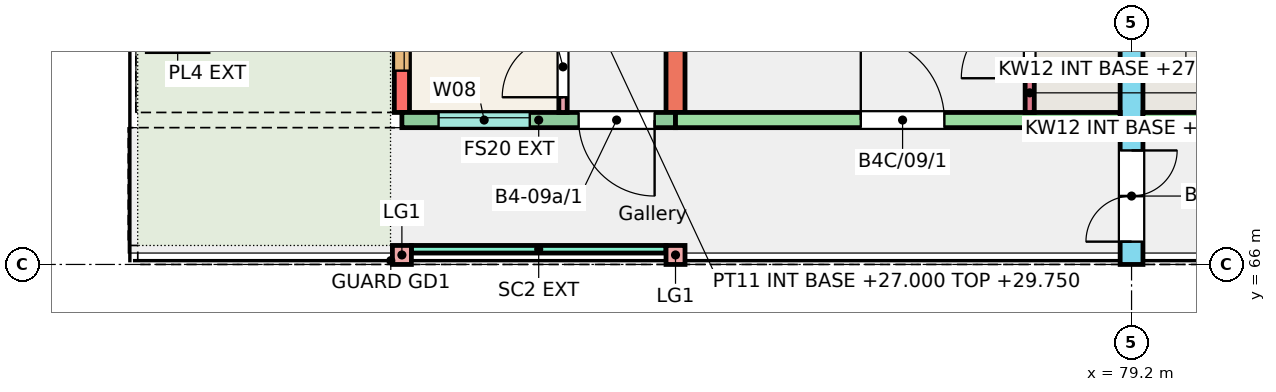
"""IFC4 building model, lengths in metres.
Left out: names, types, materials, properties, quantities, classifications, styles, units other than length and angle.
Written with IfcOpenShell. Run it as: python <this file> out.ifc"""

import sys

from ifc_helpers import new_model, si_unit, direction, frame, frame_2d, origin, origin_2d, place, context, subcontext, project, spatial, rectangle, extrude, element, fill, save


model = new_model("IFC4")
c1 = context("Model", 3, precision=1e-05, world=origin(), true_north=direction((0.0, 1.0)))
c2 = subcontext(c1, "Body", "Model", "MODEL_VIEW")
j1 = project(units=[si_unit("LENGTHUNIT", "METRE"), si_unit("PLANEANGLEUNIT", "RADIAN")], contexts=[c1])
p1 = place(None, origin())
s1 = spatial("IfcSite", under=j1, at=p1, CompositionType="ELEMENT")
p2 = place(p1, origin())
s2 = spatial("IfcBuilding", under=s1, at=p2, CompositionType="ELEMENT")
p3 = place(p2, frame((0.0, 0.0, 27.0)))
s3 = spatial("IfcBuildingStorey", under=s2, at=p3, CompositionType="ELEMENT", Elevation=27.0)
p4 = place(p3, frame((69.6, 68.0, 0.0), z_axis=(0.0, 0.0, 1.0), x_axis=(0.0, 1.0, 0.0)))
e1 = element("IfcWall", 1, at=p4, inside=s3, PredefinedType="SHEAR", context=c2, shape_type="SweptSolid", body=[
    extrude(rectangle(XDim=9.0, YDim=0.2, at=frame_2d((4.5, 0.0))), origin(), (0.0, 0.0, 1.0), 3.0),
])
p5 = place(p4, frame((0.55, 0.0, 0.9)))
e2 = element("IfcOpeningElement", 2, at=p5, cuts=e1, PredefinedType="OPENING", context=c2, shape_type="SweptSolid", body=[
    extrude(rectangle(XDim=1.2, YDim=1.5, at=frame_2d((0.6, 0.75))), frame((0.0, 0.11, 0.0), z_axis=(0.0, -1.0, 0.0), x_axis=(1.0, 0.0, 0.0)), (0.0, 0.0, 1.0), 0.22),
])
p6 = place(p4, frame((7.552, 0.0, 0.9)))
e3 = element("IfcOpeningElement", 3, at=p6, cuts=e1, PredefinedType="OPENING", context=c2, shape_type="SweptSolid", body=[
    extrude(rectangle(XDim=1.2, YDim=1.5, at=frame_2d((0.6, 0.75))), frame((0.0, 0.11, 0.0), z_axis=(0.0, -1.0, 0.0), x_axis=(1.0, 0.0, 0.0)), (0.0, 0.0, 1.0), 0.22),
])
p7 = place(p4, frame((6.205, 0.0, 0.0)))
e4 = element("IfcOpeningElement", 4, at=p7, cuts=e1, PredefinedType="OPENING", context=c2, shape_type="SweptSolid", body=[
    extrude(rectangle(XDim=1.0, YDim=2.1, at=frame_2d((0.5, 1.05))), frame((0.0, 0.11, 0.0), z_axis=(0.0, -1.0, 0.0), x_axis=(1.0, 0.0, 0.0)), (0.0, 0.0, 1.0), 0.22),
])
p8 = place(p3, frame((73.2, 68.0, 0.0), z_axis=(0.0, 0.0, 1.0), x_axis=(0.0, 1.0, 0.0)))
e5 = element("IfcWall", 5, at=p8, inside=s3, PredefinedType="SHEAR", context=c2, shape_type="SweptSolid", body=[
    extrude(rectangle(XDim=9.0, YDim=0.25, at=frame_2d((4.5, 0.0))), origin(), (0.0, 0.0, 1.0), 3.0),
])
p9 = place(p3, frame((79.2, 66.0, 0.0), z_axis=(0.0, 0.0, 1.0), x_axis=(0.0, 1.0, 0.0)))
e6 = element("IfcWall", 6, at=p9, inside=s3, PredefinedType="SHEAR", context=c2, shape_type="SweptSolid", body=[
    extrude(rectangle(XDim=11.0, YDim=0.3, at=frame_2d((5.5, 0.0))), origin(), (0.0, 0.0, 1.0), 3.0),
])
p10 = place(p9, frame((0.3, 0.0, 0.0)))
e7 = element("IfcOpeningElement", 7, at=p10, cuts=e6, PredefinedType="OPENING", context=c2, shape_type="SweptSolid", body=[
    extrude(rectangle(XDim=1.2, YDim=2.1, at=frame_2d((0.6, 1.05))), frame((0.0, 0.16, 0.0), z_axis=(0.0, -1.0, 0.0), x_axis=(1.0, 0.0, 0.0)), (0.0, 0.0, 1.0), 0.32),
])
p11 = place(p3, frame((69.6, 67.9, 0.0), z_axis=(0.0, 0.0, 1.0), x_axis=(1.0, 0.0, 0.0)))
e8 = element("IfcWall", 8, at=p11, inside=s3, PredefinedType="SOLIDWALL", context=c2, shape_type="SweptSolid", body=[
    extrude(rectangle(XDim=3.6, YDim=0.2, at=frame_2d((1.8, 0.0))), origin(), (0.0, 0.0, 1.0), 3.0),
])
p12 = place(p11, frame((0.482, 0.0, 1.1)))
e9 = element("IfcOpeningElement", 9, at=p12, cuts=e8, PredefinedType="OPENING", context=c2, shape_type="SweptSolid", body=[
    extrude(rectangle(XDim=1.2, YDim=1.3, at=frame_2d((0.6, 0.65))), frame((0.0, 0.11, 0.0), z_axis=(0.0, -1.0, 0.0), x_axis=(1.0, 0.0, 0.0)), (0.0, 0.0, 1.0), 0.22),
])
p13 = place(p11, frame((2.325, 0.0, 0.0)))
e10 = element("IfcOpeningElement", 10, at=p13, cuts=e8, PredefinedType="OPENING", context=c2, shape_type="SweptSolid", body=[
    extrude(rectangle(XDim=1.0, YDim=2.1, at=frame_2d((0.5, 1.05))), frame((0.0, 0.11, 0.0), z_axis=(0.0, -1.0, 0.0), x_axis=(1.0, 0.0, 0.0)), (0.0, 0.0, 1.0), 0.22),
])
p14 = place(p3, frame((73.2, 67.9, 0.0), z_axis=(0.0, 0.0, 1.0), x_axis=(1.0, 0.0, 0.0)))
e11 = element("IfcWall", 11, at=p14, inside=s3, PredefinedType="SHEAR", context=c2, shape_type="SweptSolid", body=[
    extrude(rectangle(XDim=5.85, YDim=0.2, at=frame_2d((2.925, 0.0))), origin(), (0.0, 0.0, 1.0), 3.0),
])
p15 = place(p14, frame((2.438, 0.0, 0.0)))
e12 = element("IfcOpeningElement", 12, at=p15, cuts=e11, PredefinedType="OPENING", context=c2, shape_type="SweptSolid", body=[
    extrude(rectangle(XDim=1.1, YDim=2.1, at=frame_2d((0.55, 1.05))), frame((0.0, 0.11, 0.0), z_axis=(0.0, -1.0, 0.0), x_axis=(1.0, 0.0, 0.0)), (0.0, 0.0, 1.0), 0.22),
])
p16 = place(p3, frame((77.86, 68.0, 0.0), z_axis=(0.0, 0.0, 1.0), x_axis=(0.0, 1.0, 0.0)))
e13 = element("IfcWall", 13, at=p16, inside=s3, PredefinedType="SHEAR", context=c2, shape_type="SweptSolid", body=[
    extrude(rectangle(XDim=1.72, YDim=0.12, at=frame_2d((0.86, 0.0))), origin(), (0.0, 0.0, 1.0), 3.0),
])
p17 = place(p16, frame((0.45, 0.0, 0.0)))
e14 = element("IfcOpeningElement", 14, at=p17, cuts=e13, PredefinedType="OPENING", context=c2, shape_type="SweptSolid", body=[
    extrude(rectangle(XDim=0.9, YDim=2.1, at=frame_2d((0.45, 1.05))), frame((0.0, 0.07, 0.0), z_axis=(0.0, -1.0, 0.0), x_axis=(1.0, 0.0, 0.0)), (0.0, 0.0, 1.0), 0.14),
])
p18 = place(p3, frame((79.35, 67.9, 0.0), z_axis=(0.0, 0.0, 1.0), x_axis=(1.0, 0.0, 0.0)))
e15 = element("IfcWall", 15, at=p18, inside=s3, PredefinedType="SHEAR", context=c2, shape_type="SweptSolid", body=[
    extrude(rectangle(XDim=5.85, YDim=0.2, at=frame_2d((2.925, 0.0))), origin(), (0.0, 0.0, 1.0), 2.75),
])
p19 = place(p18, frame((2.312, 0.0, 0.0)))
e16 = element("IfcOpeningElement", 16, at=p19, cuts=e15, PredefinedType="OPENING", context=c2, shape_type="SweptSolid", body=[
    extrude(rectangle(XDim=1.1, YDim=2.1, at=frame_2d((0.55, 1.05))), frame((0.0, 0.11, 0.0), z_axis=(0.0, -1.0, 0.0), x_axis=(1.0, 0.0, 0.0)), (0.0, 0.0, 1.0), 0.22),
])
for number, where, z_axis, x_axis in (
    (17, (69.6, 66.125, 0.0), (0.0, 0.0, 1.0), (1.0, 0.0, 0.0)),
    (18, (73.2, 66.125, 0.0), (0.0, 0.0, 1.0), (1.0, 0.0, 0.0)),
):
    element("IfcColumn", number, at=place(p3, frame(where, z_axis=z_axis, x_axis=x_axis)), inside=s3, PredefinedType="COLUMN", context=c2, shape_type="SweptSolid", body=[
        extrude(rectangle(XDim=0.25, YDim=0.25, at=origin_2d()), origin(), (0.0, 0.0, 1.0), 3.0),
    ])
p20 = place(p3, frame((66.25, 68.9, 0.01), z_axis=(0.0, 0.0, 1.0), x_axis=(1.0, 0.0, 0.0)))
e19 = element("IfcWall", 19, at=p20, inside=s3, PredefinedType="SOLIDWALL", context=c2, shape_type="SweptSolid", body=[
    extrude(rectangle(XDim=0.8, YDim=0.2, at=frame_2d((0.4, 0.0))), origin(), (0.0, 0.0, 1.0), 0.45),
])
p21 = place(p3, frame((69.725, 66.2, 0.0), z_axis=(0.0, 0.0, 1.0), x_axis=(1.0, 0.0, 0.0)))
e20 = element("IfcWall", 20, at=p21, inside=s3, PredefinedType="SOLIDWALL", context=c2, shape_type="SweptSolid", body=[
    extrude(rectangle(XDim=3.35, YDim=0.1, at=frame_2d((1.675, 0.0))), origin(), (0.0, 0.0, 1.0), 2.45),
])
p22 = place(p3, frame((71.72, 68.0, 0.0), z_axis=(0.0, 0.0, 1.0), x_axis=(0.0, 1.0, 0.0)))
e21 = element("IfcWall", 21, at=p22, inside=s3, PredefinedType="PARTITIONING", context=c2, shape_type="SweptSolid", body=[
    extrude(rectangle(XDim=4.3, YDim=0.11, at=frame_2d((2.15, 0.0))), origin(), (0.0, 0.0, 1.0), 2.75),
])
p23 = place(p22, frame((0.2, 0.0, 0.0)))
e22 = element("IfcOpeningElement", 22, at=p23, cuts=e21, PredefinedType="OPENING", context=c2, shape_type="SweptSolid", body=[
    extrude(rectangle(XDim=0.8, YDim=2.1, at=frame_2d((0.4, 1.05))), frame((0.0, 0.065, 0.0), z_axis=(0.0, -1.0, 0.0), x_axis=(1.0, 0.0, 0.0)), (0.0, 0.0, 1.0), 0.13),
])
p24 = place(p22, frame((3.35, 0.0, 0.0)))
e23 = element("IfcOpeningElement", 23, at=p24, cuts=e21, PredefinedType="OPENING", context=c2, shape_type="SweptSolid", body=[
    extrude(rectangle(XDim=0.8, YDim=2.1, at=frame_2d((0.4, 1.05))), frame((0.0, 0.065, 0.0), z_axis=(0.0, -1.0, 0.0), x_axis=(1.0, 0.0, 0.0)), (0.0, 0.0, 1.0), 0.13),
])
p25 = place(p12, origin())
e24 = element("IfcWindow", 24, at=p25, inside=s3, PartitioningType="SINGLE_PANEL", PredefinedType="WINDOW", context=c2, shape_type="SweptSolid", body=[
    extrude(rectangle(XDim=1.2, YDim=1.3, at=frame_2d((0.6, 0.65))), frame((0.0, 0.06, 0.0), z_axis=(0.0, -1.0, 0.0), x_axis=(1.0, 0.0, 0.0)), (0.0, 0.0, 1.0), 0.06),
])
fill(e9, e24)
p26 = place(p5, origin())
e25 = element("IfcWindow", 25, at=p26, inside=s3, PartitioningType="SINGLE_PANEL", PredefinedType="WINDOW", context=c2, shape_type="SweptSolid", body=[
    extrude(rectangle(XDim=1.2, YDim=1.5, at=frame_2d((0.6, 0.75))), frame((0.0, 0.0, 0.0), z_axis=(0.0, -1.0, 0.0), x_axis=(1.0, 0.0, 0.0)), (0.0, 0.0, 1.0), 0.06),
])
fill(e2, e25)
p27 = place(p13, origin())
e26 = element("IfcDoor", 26, at=p27, inside=s3, OperationType="SINGLE_SWING_RIGHT", PredefinedType="DOOR", context=c2, shape_type="SweptSolid", body=[
    extrude(rectangle(XDim=1.0, YDim=2.1, at=frame_2d((0.5, 1.05))), frame((0.0, 0.025, 0.0), z_axis=(0.0, -1.0, 0.0), x_axis=(1.0, 0.0, 0.0)), (0.0, 0.0, 1.0), 0.05),
])
fill(e10, e26)
p28 = place(p23, origin())
e27 = element("IfcDoor", 27, at=p28, inside=s3, OperationType="SINGLE_SWING_LEFT", PredefinedType="DOOR", context=c2, shape_type="SweptSolid", body=[
    extrude(rectangle(XDim=0.8, YDim=2.1, at=frame_2d((0.4, 1.05))), frame((0.0, 0.025, 0.0), z_axis=(0.0, -1.0, 0.0), x_axis=(1.0, 0.0, 0.0)), (0.0, 0.0, 1.0), 0.05),
])
fill(e22, e27)
p29 = place(p15, origin())
e28 = element("IfcDoor", 28, at=p29, inside=s3, OperationType="SINGLE_SWING_LEFT", PredefinedType="DOOR", context=c2, shape_type="SweptSolid", body=[
    extrude(rectangle(XDim=1.1, YDim=2.1, at=frame_2d((0.55, 1.05))), frame((0.0, 0.025, 0.0), z_axis=(0.0, -1.0, 0.0), x_axis=(1.0, 0.0, 0.0)), (0.0, 0.0, 1.0), 0.05),
])
fill(e12, e28)
p30 = place(p17, origin())
e29 = element("IfcDoor", 29, at=p30, inside=s3, OperationType="SINGLE_SWING_LEFT", PredefinedType="DOOR", context=c2, shape_type="SweptSolid", body=[
    extrude(rectangle(XDim=0.9, YDim=2.1, at=frame_2d((0.45, 1.05))), frame((0.0, 0.025, 0.0), z_axis=(0.0, -1.0, 0.0), x_axis=(1.0, 0.0, 0.0)), (0.0, 0.0, 1.0), 0.05),
])
fill(e14, e29)
p31 = place(p10, origin())
e30 = element("IfcDoor", 30, at=p31, inside=s3, OperationType="DOUBLE_DOOR_SINGLE_SWING", PredefinedType="DOOR", context=c2, shape_type="SweptSolid", body=[
    extrude(rectangle(XDim=1.2, YDim=2.1, at=frame_2d((0.6, 1.05))), frame((0.0, 0.025, 0.0), z_axis=(0.0, -1.0, 0.0), x_axis=(1.0, 0.0, 0.0)), (0.0, 0.0, 1.0), 0.05),
])
fill(e7, e30)
save(model, sys.argv[1])
